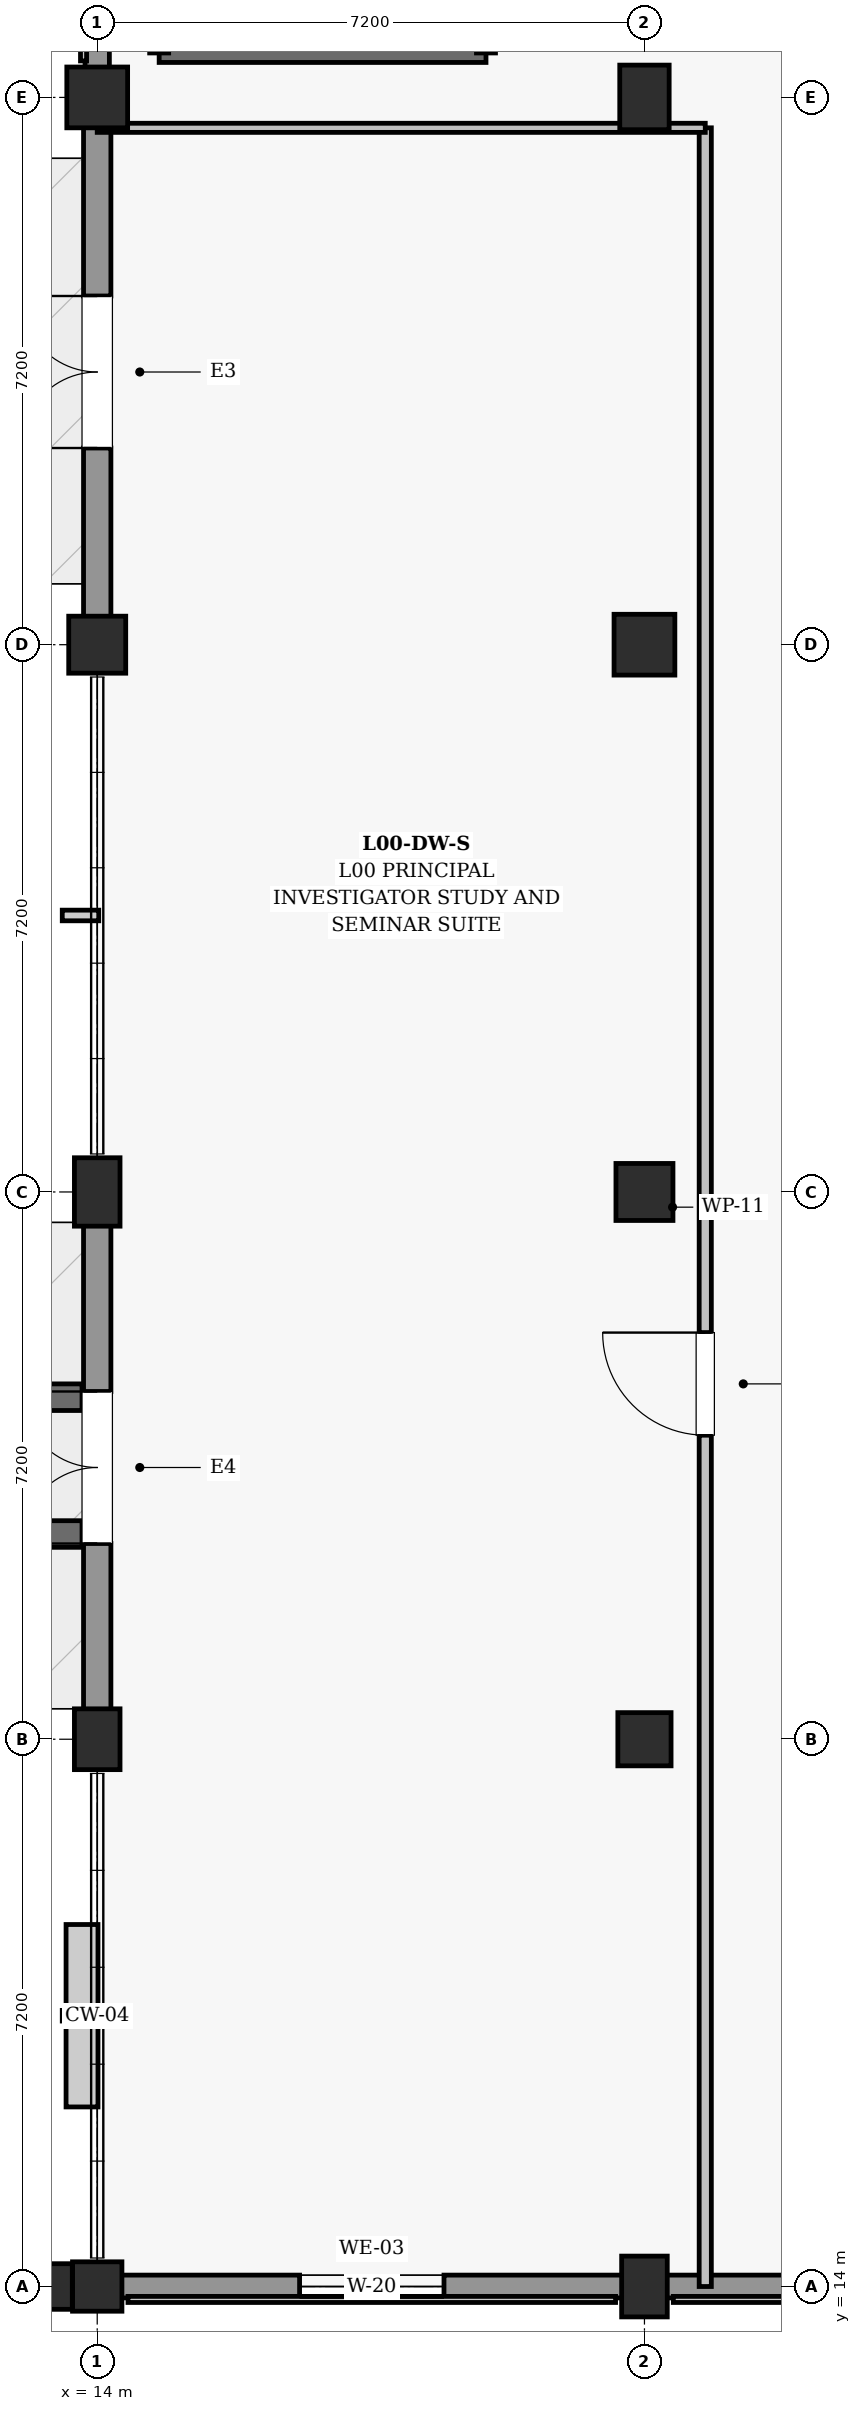
"""IFC4 building model, lengths in metres.
Left out: names, types, materials, properties, quantities, classifications, styles, units other than length and angle.
Written with IfcOpenShell. Run it as: python <this file> out.ifc"""

import sys

from ifc_helpers import new_model, si_unit, direction, frame, frame_2d, origin, origin_2d, place, context, subcontext, project, spatial, polyline, rectangle, outline, extrude, element, fill, save


model = new_model("IFC4")
c1 = context("Model", 3, precision=1e-05, world=origin(), true_north=direction((0.0, 1.0)))
c2 = subcontext(c1, "Body", "Model", "MODEL_VIEW")
j1 = project(units=[si_unit("LENGTHUNIT", "METRE"), si_unit("PLANEANGLEUNIT", "RADIAN")], contexts=[c1])
p1 = place(None, origin())
s1 = spatial("IfcSite", under=j1, at=p1, CompositionType="ELEMENT")
p2 = place(p1, origin())
s2 = spatial("IfcBuilding", under=s1, at=p2, CompositionType="ELEMENT")
p3 = place(p2, origin())
s3 = spatial("IfcBuildingStorey", under=s2, at=p3, CompositionType="ELEMENT", Elevation=0.0)
p4 = place(p3, frame((14.0, 14.0, 0.0), z_axis=(0.0, 0.0, 1.0), x_axis=(1.0, 0.0, 0.0)))
e1 = element("IfcColumn", 1, at=p4, inside=s3, PredefinedType="COLUMN", context=c2, shape_type="SweptSolid", body=[
    extrude(rectangle(XDim=0.65, YDim=0.65, at=origin_2d()), origin(), (0.0, 0.0, 1.0), 5.4),
])
p5 = place(p3, frame((14.0, 21.2, 0.0), z_axis=(0.0, 0.0, 1.0), x_axis=(1.0, 0.0, 0.0)))
e2 = element("IfcColumn", 2, at=p5, inside=s3, PredefinedType="COLUMN", context=c2, shape_type="SweptSolid", body=[
    extrude(rectangle(XDim=0.6, YDim=0.8, at=origin_2d()), origin(), (0.0, 0.0, 1.0), 5.4),
])
p6 = place(p3, frame((14.0, 28.4, 0.0), z_axis=(0.0, 0.0, 1.0), x_axis=(1.0, 0.0, 0.0)))
e3 = element("IfcColumn", 3, at=p6, inside=s3, PredefinedType="COLUMN", context=c2, shape_type="SweptSolid", body=[
    extrude(rectangle(XDim=0.6, YDim=0.9, at=origin_2d()), origin(), (0.0, 0.0, 1.0), 5.4),
])
p7 = place(p3, frame((14.0, 35.6, 0.0), z_axis=(0.0, 0.0, 1.0), x_axis=(1.0, 0.0, 0.0)))
e4 = element("IfcColumn", 4, at=p7, inside=s3, PredefinedType="COLUMN", context=c2, shape_type="SweptSolid", body=[
    extrude(rectangle(XDim=0.75, YDim=0.75, at=origin_2d()), origin(), (0.0, 0.0, 1.0), 5.4),
])
p8 = place(p3, frame((14.0, 42.8, 0.0), z_axis=(0.0, 0.0, 1.0), x_axis=(1.0, 0.0, 0.0)))
e5 = element("IfcColumn", 5, at=p8, inside=s3, PredefinedType="COLUMN", context=c2, shape_type="SweptSolid", body=[
    extrude(rectangle(XDim=0.8, YDim=0.8, at=origin_2d()), origin(), (0.0, 0.0, 1.0), 5.4),
])
p9 = place(p3, frame((21.2, 14.0, 0.0), z_axis=(0.0, 0.0, 1.0), x_axis=(1.0, 0.0, 0.0)))
e6 = element("IfcColumn", 6, at=p9, inside=s3, PredefinedType="COLUMN", context=c2, shape_type="SweptSolid", body=[
    extrude(rectangle(XDim=0.6, YDim=0.8, at=origin_2d()), origin(), (0.0, 0.0, 1.0), 5.4),
])
p10 = place(p3, frame((21.2, 21.2, 0.0), z_axis=(0.0, 0.0, 1.0), x_axis=(1.0, 0.0, 0.0)))
e7 = element("IfcColumn", 7, at=p10, inside=s3, PredefinedType="COLUMN", context=c2, shape_type="SweptSolid", body=[
    extrude(rectangle(XDim=0.7, YDim=0.7, at=origin_2d()), origin(), (0.0, 0.0, 1.0), 5.4),
])
p11 = place(p3, frame((21.2, 28.4, 0.0), z_axis=(0.0, 0.0, 1.0), x_axis=(1.0, 0.0, 0.0)))
e8 = element("IfcColumn", 8, at=p11, inside=s3, PredefinedType="COLUMN", context=c2, shape_type="SweptSolid", body=[
    extrude(rectangle(XDim=0.75, YDim=0.75, at=origin_2d()), origin(), (0.0, 0.0, 1.0), 5.4),
])
p12 = place(p3, frame((21.2, 35.6, 0.0), z_axis=(0.0, 0.0, 1.0), x_axis=(1.0, 0.0, 0.0)))
e9 = element("IfcColumn", 9, at=p12, inside=s3, PredefinedType="COLUMN", context=c2, shape_type="SweptSolid", body=[
    extrude(rectangle(XDim=0.8, YDim=0.8, at=origin_2d()), origin(), (0.0, 0.0, 1.0), 5.4),
])
p13 = place(p3, frame((21.2, 42.8, 0.0), z_axis=(0.0, 0.0, 1.0), x_axis=(1.0, 0.0, 0.0)))
e10 = element("IfcColumn", 10, at=p13, inside=s3, PredefinedType="COLUMN", context=c2, shape_type="SweptSolid", body=[
    extrude(rectangle(XDim=0.65, YDim=0.85, at=origin_2d()), origin(), (0.0, 0.0, 1.0), 5.4),
])
p14 = place(p3, frame((13.247, 14.0, 0.0), z_axis=(0.0, 0.0, 1.0), x_axis=(0.0, 1.0, 0.0)))
e11 = element("IfcColumn", 11, at=p14, inside=s3, PredefinedType="PILASTER", context=c2, shape_type="SweptSolid", body=[
    extrude(rectangle(XDim=0.6, YDim=0.85, at=origin_2d()), origin(), (0.0, 0.0, 1.0), 5.4),
])
p15 = place(p3, frame((14.0, 21.58, 0.0), z_axis=(0.0, 0.0, 1.0), x_axis=(0.0, 1.0, 0.0)))
e12 = element("IfcWall", 12, at=p15, inside=s3, PredefinedType="SOLIDWALL", context=c2, shape_type="SweptSolid", body=[
    extrude(rectangle(XDim=6.39, YDim=0.36, at=frame_2d((3.195, 0.0))), origin(), (0.0, 0.0, 1.0), 4.355),
])
p16 = place(p15, frame((2.195, 0.0, 0.0)))
e13 = element("IfcOpeningElement", 13, at=p16, cuts=e12, PredefinedType="OPENING", context=c2, shape_type="SweptSolid", body=[
    extrude(rectangle(XDim=2.0, YDim=2.4, at=frame_2d((1.0, 1.2))), frame((0.0, 0.19, 0.0), z_axis=(0.0, -1.0, 0.0), x_axis=(1.0, 0.0, 0.0)), (0.0, 0.0, 1.0), 0.38),
])
p17 = place(p3, frame((14.0, 35.955, 0.0), z_axis=(0.0, 0.0, 1.0), x_axis=(0.0, 1.0, 0.0)))
e14 = element("IfcWall", 14, at=p17, inside=s3, PredefinedType="SOLIDWALL", context=c2, shape_type="SweptSolid", body=[
    extrude(rectangle(XDim=6.465, YDim=0.36, at=frame_2d((3.232, 0.0))), origin(), (0.0, 0.0, 1.0), 4.275),
])
p18 = place(p17, frame((2.232, 0.0, 0.0)))
e15 = element("IfcOpeningElement", 15, at=p18, cuts=e14, PredefinedType="OPENING", context=c2, shape_type="SweptSolid", body=[
    extrude(rectangle(XDim=2.0, YDim=2.4, at=frame_2d((1.0, 1.2))), frame((0.0, 0.19, 0.0), z_axis=(0.0, -1.0, 0.0), x_axis=(1.0, 0.0, 0.0)), (0.0, 0.0, 1.0), 0.38),
])
p19 = place(p3, frame((14.0, 43.18, 0.0), z_axis=(0.0, 0.0, 1.0), x_axis=(0.0, 1.0, 0.0)))
e16 = element("IfcWall", 16, at=p19, inside=s3, PredefinedType="SOLIDWALL", context=c2, shape_type="SweptSolid", body=[
    extrude(rectangle(XDim=6.44, YDim=0.32, at=frame_2d((3.22, 0.0))), origin(), (0.0, 0.0, 1.0), 4.275),
])
p20 = place(p3, frame((14.305, 14.0, 0.0), z_axis=(0.0, 0.0, 1.0), x_axis=(1.0, 0.0, 0.0)))
e17 = element("IfcWall", 17, at=p20, inside=s3, PredefinedType="SOLIDWALL", context=c2, shape_type="SweptSolid", body=[
    extrude(rectangle(XDim=6.615, YDim=0.3, at=frame_2d((3.308, 0.0))), origin(), (0.0, 0.0, 1.0), 4.475),
])
p21 = place(p20, frame((2.357, 0.0, 0.95)))
e18 = element("IfcOpeningElement", 18, at=p21, cuts=e17, PredefinedType="OPENING", context=c2, shape_type="SweptSolid", body=[
    extrude(rectangle(XDim=1.9, YDim=2.6, at=frame_2d((0.95, 1.3))), frame((0.0, 0.16, 0.0), z_axis=(0.0, -1.0, 0.0), x_axis=(1.0, 0.0, 0.0)), (0.0, 0.0, 1.0), 0.32),
])
p22 = place(p3, frame((21.48, 14.0, 0.0), z_axis=(0.0, 0.0, 1.0), x_axis=(1.0, 0.0, 0.0)))
e19 = element("IfcWall", 19, at=p22, inside=s3, PredefinedType="SOLIDWALL", context=c2, shape_type="SweptSolid", body=[
    extrude(rectangle(XDim=6.59, YDim=0.3, at=frame_2d((3.295, 0.0))), origin(), (0.0, 0.0, 1.0), 4.375),
])
p23 = place(p22, frame((4.55, 0.0, 0.95)))
e20 = element("IfcOpeningElement", 20, at=p23, cuts=e19, PredefinedType="OPENING", context=c2, shape_type="SweptSolid", body=[
    extrude(rectangle(XDim=1.1, YDim=2.3, at=frame_2d((0.55, 1.15))), frame((0.0, 0.16, 0.0), z_axis=(0.0, -1.0, 0.0), x_axis=(1.0, 0.0, 0.0)), (0.0, 0.0, 1.0), 0.32),
])
for number, where, z_axis, x_axis in (
    (21, (4.2, 23.9, -0.67), (0.0, 0.0, 1.0), (1.0, 0.0, 0.0)),
    (22, (4.2, 25.7, -0.67), (0.0, 0.0, 1.0), (1.0, 0.0, 0.0)),
):
    element("IfcWall", number, at=place(p3, frame(where, z_axis=z_axis, x_axis=x_axis)), inside=s3, PredefinedType="USERDEFINED", context=c2, shape_type="SweptSolid", body=[
        extrude(outline(polyline([(0.0, 0.0), (9.6, 0.0), (9.6, 0.79), (7.2, 0.79), (1.8, 0.35), (0.0, 0.35), (0.0, 0.0)])), frame((0.0, 0.175, 0.0), z_axis=(0.0, -1.0, 0.0), x_axis=(1.0, 0.0, 0.0)), (0.0, 0.0, 1.0), 0.35),
    ])
p24 = place(p3, frame((14.815, 43.385, 0.0), z_axis=(0.0, 0.0, 1.0), x_axis=(1.0, 0.0, 0.0)))
e23 = element("IfcWall", 23, at=p24, inside=s3, PredefinedType="SHEAR", context=c2, shape_type="SweptSolid", body=[
    extrude(rectangle(XDim=4.3, YDim=0.25, at=frame_2d((2.15, 0.0))), origin(), (0.0, 0.0, 1.0), 5.095),
])
p25 = place(p3, frame((19.115, 43.385, 0.0), z_axis=(0.0, 0.0, 1.0), x_axis=(0.0, 1.0, 0.0)))
e24 = element("IfcWall", 24, at=p25, inside=s3, PredefinedType="SHEAR", context=c2, shape_type="SweptSolid", body=[
    extrude(rectangle(XDim=10.63, YDim=0.25, at=frame_2d((5.315, 0.0))), origin(), (0.0, 0.0, 1.0), 5.095),
])
p26 = place(p25, frame((0.55, 0.0, 0.0)))
e25 = element("IfcOpeningElement", 25, at=p26, cuts=e24, PredefinedType="OPENING", context=c2, shape_type="SweptSolid", body=[
    extrude(rectangle(XDim=1.2, YDim=2.15, at=frame_2d((0.6, 1.075))), frame((0.0, 0.135, 0.0), z_axis=(0.0, -1.0, 0.0), x_axis=(1.0, 0.0, 0.0)), (0.0, 0.0, 1.0), 0.27),
])
p27 = place(p3, frame((14.815, 54.015, 0.0), z_axis=(0.0, 0.0, 1.0), x_axis=(0.0, -1.0, 0.0)))
e26 = element("IfcWall", 26, at=p27, inside=s3, PredefinedType="SHEAR", context=c2, shape_type="SweptSolid", body=[
    extrude(rectangle(XDim=10.63, YDim=0.25, at=frame_2d((5.315, 0.0))), origin(), (0.0, 0.0, 1.0), 5.095),
])
p28 = place(p3, frame((22.0, 14.0, 0.0), z_axis=(0.0, 0.0, 1.0), x_axis=(0.0, 1.0, 0.0)))
e27 = element("IfcWall", 27, at=p28, inside=s3, PredefinedType="PARTITIONING", context=c2, shape_type="SweptSolid", body=[
    extrude(rectangle(XDim=28.4, YDim=0.16, at=frame_2d((14.2, 0.0))), origin(), (0.0, 0.0, 1.0), 4.38),
])
p29 = place(p28, frame((11.2, 0.0, 0.0)))
e28 = element("IfcOpeningElement", 28, at=p29, cuts=e27, PredefinedType="OPENING", context=c2, shape_type="SweptSolid", body=[
    extrude(rectangle(XDim=1.35, YDim=2.2, at=frame_2d((0.675, 1.1))), frame((0.0, 0.09, 0.0), z_axis=(0.0, -1.0, 0.0), x_axis=(1.0, 0.0, 0.0)), (0.0, 0.0, 1.0), 0.18),
])
p30 = place(p3, frame((14.0, 42.4, 0.0), z_axis=(0.0, 0.0, 1.0), x_axis=(1.0, 0.0, 0.0)))
e29 = element("IfcWall", 29, at=p30, inside=s3, PredefinedType="PARTITIONING", context=c2, shape_type="SweptSolid", body=[
    extrude(rectangle(XDim=8.0, YDim=0.12, at=frame_2d((4.0, 0.0))), origin(), (0.0, 0.0, 1.0), 4.48),
])
p31 = place(p16, origin())
e30 = element("IfcDoor", 30, at=p31, inside=s3, OperationType="DOUBLE_DOOR_SINGLE_SWING", PredefinedType="DOOR", context=c2, shape_type="SweptSolid", body=[
    extrude(rectangle(XDim=2.0, YDim=2.4, at=frame_2d((1.0, 1.2))), frame((0.0, 0.025, 0.0), z_axis=(0.0, -1.0, 0.0), x_axis=(1.0, 0.0, 0.0)), (0.0, 0.0, 1.0), 0.05),
])
fill(e13, e30)
p32 = place(p18, origin())
e31 = element("IfcDoor", 31, at=p32, inside=s3, OperationType="DOUBLE_DOOR_SINGLE_SWING", PredefinedType="DOOR", context=c2, shape_type="SweptSolid", body=[
    extrude(rectangle(XDim=2.0, YDim=2.4, at=frame_2d((1.0, 1.2))), frame((0.0, 0.025, 0.0), z_axis=(0.0, -1.0, 0.0), x_axis=(1.0, 0.0, 0.0)), (0.0, 0.0, 1.0), 0.05),
])
fill(e15, e31)
p33 = place(p21, origin())
e32 = element("IfcWindow", 32, at=p33, inside=s3, PartitioningType="SINGLE_PANEL", PredefinedType="WINDOW", context=c2, shape_type="SweptSolid", body=[
    extrude(rectangle(XDim=1.9, YDim=2.6, at=frame_2d((0.95, 1.3))), frame((0.0, 0.03, 0.0), z_axis=(0.0, -1.0, 0.0), x_axis=(1.0, 0.0, 0.0)), (0.0, 0.0, 1.0), 0.06),
])
fill(e18, e32)
p34 = place(p29, origin())
e33 = element("IfcDoor", 33, at=p34, inside=s3, OperationType="SINGLE_SWING_RIGHT", PredefinedType="DOOR", context=c2, shape_type="SweptSolid", body=[
    extrude(rectangle(XDim=1.35, YDim=2.2, at=frame_2d((0.675, 1.1))), frame((0.0, 0.025, 0.0), z_axis=(0.0, -1.0, 0.0), x_axis=(1.0, 0.0, 0.0)), (0.0, 0.0, 1.0), 0.05),
])
fill(e28, e33)
save(model, sys.argv[1])
